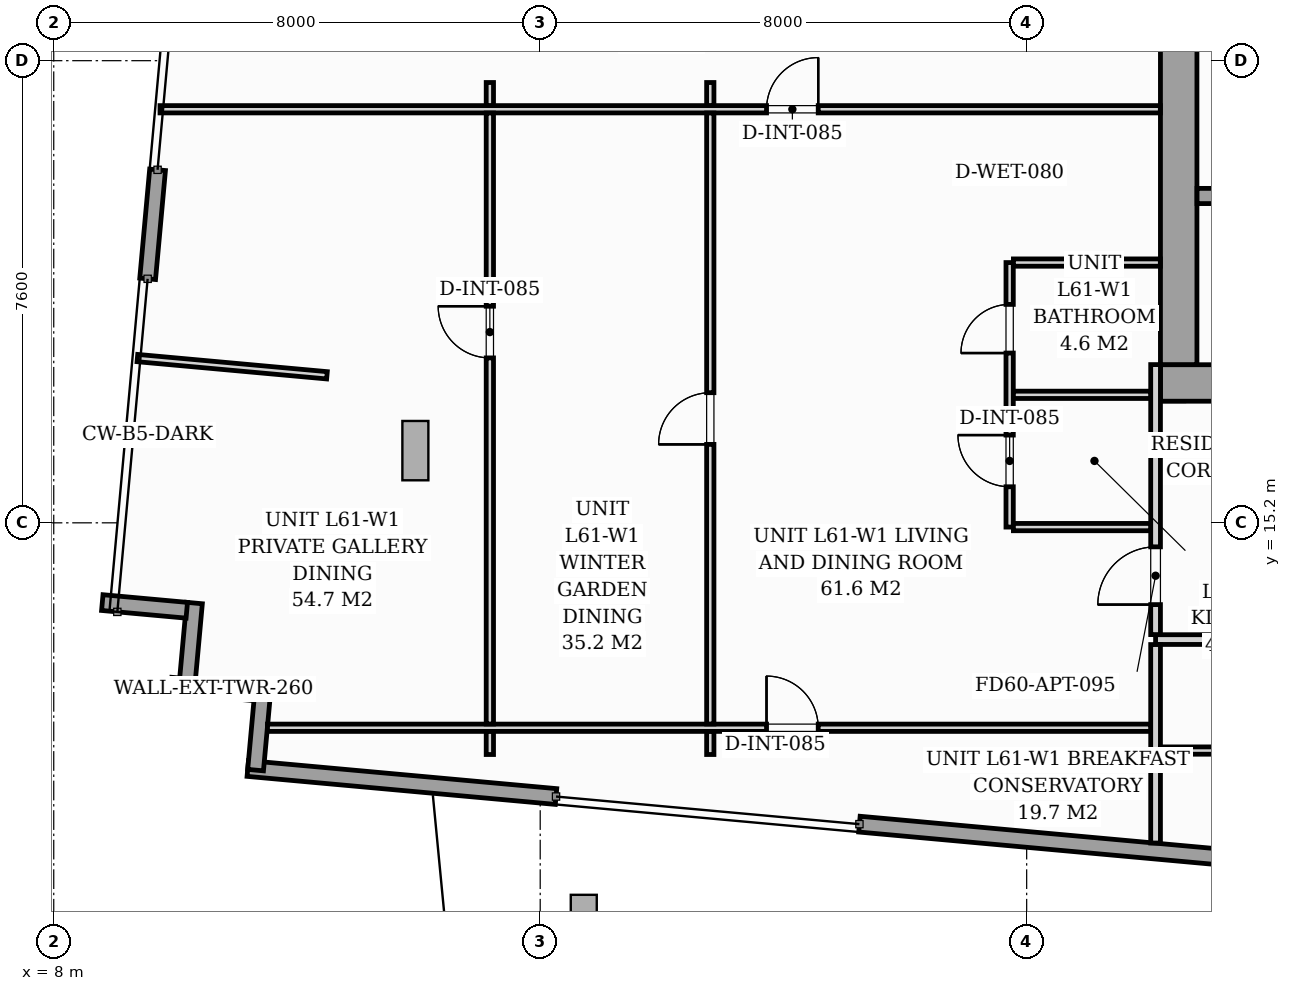
"""IFC4 building model, lengths in metres.
Left out: names, types, materials, properties, quantities, classifications, styles, units other than length and angle.
Written with IfcOpenShell. Run it as: python <this file> out.ifc"""

import sys

from ifc_helpers import new_model, si_unit, direction, frame, frame_2d, origin, origin_2d, place, context, subcontext, project, spatial, rectangle, i_section, extrude, source, transform, mapped, element, fill, save


model = new_model("IFC4")
c1 = context("Model", 3, precision=1e-05, world=origin(), true_north=direction((0.0, 1.0)))
c2 = subcontext(c1, "Body", "Model", "MODEL_VIEW")
j1 = project(units=[si_unit("LENGTHUNIT", "METRE"), si_unit("PLANEANGLEUNIT", "RADIAN")], contexts=[c1])
p1 = place(None, origin())
s1 = spatial("IfcSite", under=j1, at=p1, CompositionType="ELEMENT")
p2 = place(p1, origin())
s2 = spatial("IfcBuilding", under=s1, at=p2, CompositionType="ELEMENT")
p3 = place(p2, frame((0.0, 0.0, 211.4)))
s3 = spatial("IfcBuildingStorey", under=s2, at=p3, CompositionType="ELEMENT", Elevation=211.4)
m1 = source(origin(), c2, "Body", "SweptSolid", [
    extrude(i_section(OverallWidth=0.409, OverallDepth=0.425, WebThickness=0.033, FlangeThickness=0.052, FilletRadius=0.018, at=origin_2d()), origin(), (0.0, 0.0, 1.0), 5.196),
])
p4 = place(p3, frame((26.4, 17.4, 0.002), z_axis=(0.0, 0.0, 1.0), x_axis=(1.0, 0.0, 0.0)))
e1 = element("IfcColumn", 1, at=p4, inside=s3, PredefinedType="PILASTER", context=c2, shape_type="MappedRepresentation", body=[
    mapped(m1, transform((0.0, 0.0, 0.0), scale=1.0)),
])
m2 = source(origin(), c2, "Body", "SweptSolid", [
    extrude(i_section(OverallWidth=0.427, OverallDepth=0.976, WebThickness=0.031, FlangeThickness=0.056, FilletRadius=0.024, at=origin_2d()), origin(), (0.0, 0.0, 1.0), 8.14),
])
p5 = place(p3, frame((17.937, 7.606, 0.192), z_axis=(-0.653938069149, 0.5297612227, 0.540109293237), x_axis=(0.41967701375, -0.339984194884, 0.841594885535)))
e2 = element("IfcColumn", 2, at=p5, inside=s3, PredefinedType="COLUMN", context=c2, shape_type="MappedRepresentation", body=[
    mapped(m2, transform((0.0, 0.0, 0.0), scale=1.0)),
])
m3 = source(origin(), c2, "Body", "SweptSolid", [
    extrude(i_section(OverallWidth=0.427, OverallDepth=0.976, WebThickness=0.031, FlangeThickness=0.056, FilletRadius=0.024, at=origin_2d()), origin(), (0.0, 0.0, 1.0), 8.072),
])
p6 = place(p3, frame((28.796, 8.577, 0.191), z_axis=(-0.778187748082, 0.312466773891, 0.544782841092), x_axis=(0.50555077301, -0.202994482334, 0.838577161656)))
e3 = element("IfcColumn", 3, at=p6, inside=s3, PredefinedType="COLUMN", context=c2, shape_type="MappedRepresentation", body=[
    mapped(m3, transform((0.0, 0.0, 0.0), scale=1.0)),
])
m4 = source(origin(), c2, "Body", "SweptSolid", [
    extrude(i_section(OverallWidth=0.427, OverallDepth=0.976, WebThickness=0.031, FlangeThickness=0.056, FilletRadius=0.024, at=origin_2d()), origin(), (0.0, 0.0, 1.0), 7.437),
])
p7 = place(p3, frame((14.865, 15.359, 0.184), z_axis=(-0.53624427181, 0.600393978381, 0.593269880977), x_axis=(0.395200173603, -0.442477089191, 0.805003632492)))
e4 = element("IfcColumn", 4, at=p7, inside=s3, PredefinedType="COLUMN", context=c2, shape_type="MappedRepresentation", body=[
    mapped(m4, transform((0.0, 0.0, 0.0), scale=1.0)),
])
p8 = place(p3, frame((11.319, 12.404, 0.0), z_axis=(0.0, 0.0, 1.0), x_axis=(-0.995881721538, 0.090661991521, 0.0)))
e5 = element("IfcWall", 5, at=p8, inside=s3, PredefinedType="STANDARD", context=c2, shape_type="SweptSolid", body=[
    extrude(rectangle(XDim=1.395, YDim=0.26, at=frame_2d((0.698, 0.0))), origin(), (0.0, 0.0, 1.0), 4.78),
])
p9 = place(p3, frame((10.188, 12.492, 0.0), z_axis=(0.0, 0.0, 1.0), x_axis=(0.090646191665, 0.995883159782, 0.0)))
e6 = element("IfcWall", 6, at=p9, inside=s3, PredefinedType="STANDARD", context=c2, shape_type="SweptSolid", body=[
    extrude(rectangle(XDim=1.395, YDim=0.26, at=frame_2d((0.698, 0.0))), origin(), (0.0, 0.0, 1.0), 4.78),
])
p10 = place(p3, frame((10.188, 13.762, 0.0), z_axis=(0.0, 0.0, 1.0), x_axis=(-0.995881721538, 0.090661991521, 0.0)))
e7 = element("IfcWall", 7, at=p10, inside=s3, PredefinedType="STANDARD", context=c2, shape_type="SweptSolid", body=[
    extrude(rectangle(XDim=1.395, YDim=0.26, at=frame_2d((0.698, 0.0))), origin(), (0.0, 0.0, 1.0), 4.78),
])
p11 = place(p3, frame((9.544, 19.213, 0.0), z_axis=(0.0, 0.0, 1.0), x_axis=(0.090731396305, 0.995875400703, 0.0)))
e8 = element("IfcWall", 8, at=p11, inside=s3, PredefinedType="STANDARD", context=c2, shape_type="SweptSolid", body=[
    extrude(rectangle(XDim=1.8, YDim=0.26, at=frame_2d((0.9, 0.0))), origin(), (0.0, 0.0, 1.0), 4.78),
])
p12 = place(p3, frame((42.761, 8.287, 0.0), z_axis=(0.0, 0.0, 1.0), x_axis=(-0.995884956798, 0.090626446601, 0.0)))
e9 = element("IfcWall", 9, at=p12, inside=s3, PredefinedType="STANDARD", context=c2, shape_type="SweptSolid", body=[
    extrude(rectangle(XDim=21.6, YDim=0.26, at=frame_2d((10.8, 0.0))), origin(), (0.0, 0.0, 1.0), 4.78),
])
p13 = place(p12, frame((12.194, 0.0, 0.75)))
e10 = element("IfcOpeningElement", 10, at=p13, cuts=e9, PredefinedType="OPENING", context=c2, shape_type="SweptSolid", body=[
    extrude(rectangle(XDim=1.6, YDim=1.5, at=frame_2d((0.8, 0.75))), frame((0.0, 0.14, 0.0), z_axis=(0.0, -1.0, 0.0), x_axis=(1.0, 0.0, 0.0)), (0.0, 0.0, 1.0), 0.28),
])
p14 = place(p3, frame((16.26, 10.699, 0.0), z_axis=(0.0, 0.0, 1.0), x_axis=(-0.995882584574, 0.09065251095, 0.0)))
e11 = element("IfcWall", 11, at=p14, inside=s3, PredefinedType="STANDARD", context=c2, shape_type="SweptSolid", body=[
    extrude(rectangle(XDim=5.09, YDim=0.26, at=frame_2d((2.545, 0.0))), origin(), (0.0, 0.0, 1.0), 4.78),
])
p15 = place(p3, frame((11.319, 11.134, 0.0), z_axis=(0.0, 0.0, 1.0), x_axis=(0.090661991521, 0.995881721538, 0.0)))
e12 = element("IfcWall", 12, at=p15, inside=s3, PredefinedType="STANDARD", context=c2, shape_type="SweptSolid", body=[
    extrude(rectangle(XDim=1.395, YDim=0.26, at=frame_2d((0.698, 0.0))), origin(), (0.0, 0.0, 1.0), 4.78),
])
p16 = place(p3, frame((26.2, 17.5, 0.0), z_axis=(0.0, 0.0, 1.0), x_axis=(1.0, 0.0, 0.0)))
e13 = element("IfcWall", 13, at=p16, inside=s3, PredefinedType="SHEAR", context=c2, shape_type="SweptSolid", body=[
    extrude(rectangle(XDim=19.6, YDim=0.6, at=frame_2d((9.8, 0.0))), origin(), (0.0, 0.0, 1.0), 5.2),
])
p17 = place(p16, frame((0.95, 0.0, 0.0)))
e14 = element("IfcOpeningElement", 14, at=p17, cuts=e13, PredefinedType="OPENING", context=c2, shape_type="SweptSolid", body=[
    extrude(rectangle(XDim=0.95, YDim=2.06, at=frame_2d((0.475, 1.03))), frame((0.0, 0.31, 0.0), z_axis=(0.0, -1.0, 0.0), x_axis=(1.0, 0.0, 0.0)), (0.0, 0.0, 1.0), 0.62),
])
p18 = place(p16, frame((9.38, 0.0, 0.0)))
e15 = element("IfcOpeningElement", 15, at=p18, cuts=e13, PredefinedType="OPENING", context=c2, shape_type="SweptSolid", body=[
    extrude(rectangle(XDim=0.9, YDim=2.06, at=frame_2d((0.45, 1.03))), frame((0.0, 0.31, 0.0), z_axis=(0.0, -1.0, 0.0), x_axis=(1.0, 0.0, 0.0)), (0.0, 0.0, 1.0), 0.62),
])
p19 = place(p16, frame((17.55, 0.0, 0.0)))
e16 = element("IfcOpeningElement", 16, at=p19, cuts=e13, PredefinedType="OPENING", context=c2, shape_type="SweptSolid", body=[
    extrude(rectangle(XDim=0.95, YDim=2.06, at=frame_2d((0.475, 1.03))), frame((0.0, 0.31, 0.0), z_axis=(0.0, -1.0, 0.0), x_axis=(1.0, 0.0, 0.0)), (0.0, 0.0, 1.0), 0.62),
])
p20 = place(p3, frame((26.5, 17.802, 0.0), z_axis=(0.0, 0.0, 1.0), x_axis=(0.0, 1.0, 0.0)))
e17 = element("IfcWall", 17, at=p20, inside=s3, PredefinedType="SHEAR", context=c2, shape_type="SweptSolid", body=[
    extrude(rectangle(XDim=5.796, YDim=0.6, at=frame_2d((2.898, 0.0))), origin(), (0.0, 0.0, 1.0), 5.2),
])
p21 = place(p3, frame((26.802, 20.575, 0.0), z_axis=(0.0, 0.0, 1.0), x_axis=(1.0, 0.0, 0.0)))
e18 = element("IfcWall", 18, at=p21, inside=s3, PredefinedType="SOLIDWALL", context=c2, shape_type="SweptSolid", body=[
    extrude(rectangle(XDim=8.148, YDim=0.25, at=frame_2d((4.074, 0.0))), origin(), (0.0, 0.0, 1.0), 5.2),
])
p22 = place(p21, frame((0.298, 0.0, 0.0)))
e19 = element("IfcOpeningElement", 19, at=p22, cuts=e18, PredefinedType="OPENING", context=c2, shape_type="SweptSolid", body=[
    extrude(rectangle(XDim=0.95, YDim=2.06, at=frame_2d((0.475, 1.03))), frame((0.0, 0.135, 0.0), z_axis=(0.0, -1.0, 0.0), x_axis=(1.0, 0.0, 0.0)), (0.0, 0.0, 1.0), 0.27),
])
p23 = place(p3, frame((26.12, 13.28, 0.0), z_axis=(0.0, 0.0, 1.0), x_axis=(1.0, 0.0, 0.0)))
e20 = element("IfcWall", 20, at=p23, inside=s3, PredefinedType="PARTITIONING", context=c2, shape_type="SweptSolid", body=[
    extrude(rectangle(XDim=19.76, YDim=0.16, at=frame_2d((9.88, 0.0))), origin(), (0.0, 0.0, 1.0), 4.345),
])
p24 = place(p23, frame((5.345, 0.0, 0.0)))
e21 = element("IfcOpeningElement", 21, at=p24, cuts=e20, PredefinedType="OPENING", context=c2, shape_type="SweptSolid", body=[
    extrude(rectangle(XDim=0.95, YDim=2.06, at=frame_2d((0.475, 1.03))), frame((0.0, 0.09, 0.0), z_axis=(0.0, -1.0, 0.0), x_axis=(1.0, 0.0, 0.0)), (0.0, 0.0, 1.0), 0.18),
])
p25 = place(p23, frame((16.52, 0.0, 0.0)))
e22 = element("IfcOpeningElement", 22, at=p25, cuts=e20, PredefinedType="OPENING", context=c2, shape_type="SweptSolid", body=[
    extrude(rectangle(XDim=0.95, YDim=2.06, at=frame_2d((0.475, 1.03))), frame((0.0, 0.09, 0.0), z_axis=(0.0, -1.0, 0.0), x_axis=(1.0, 0.0, 0.0)), (0.0, 0.0, 1.0), 0.18),
])
p26 = place(p3, frame((26.12, 9.934, 0.0), z_axis=(0.0, 0.0, 1.0), x_axis=(0.0, 1.0, 0.0)))
e23 = element("IfcWall", 23, at=p26, inside=s3, PredefinedType="PARTITIONING", context=c2, shape_type="SweptSolid", body=[
    extrude(rectangle(XDim=3.264, YDim=0.16, at=frame_2d((1.632, 0.0))), origin(), (0.0, 0.0, 1.0), 4.78),
])
p27 = place(p3, frame((26.12, 13.362, 0.0), z_axis=(0.0, 0.0, 1.0), x_axis=(0.0, 1.0, 0.0)))
e24 = element("IfcWall", 24, at=p27, inside=s3, PredefinedType="PARTITIONING", context=c2, shape_type="SweptSolid", body=[
    extrude(rectangle(XDim=4.44, YDim=0.16, at=frame_2d((2.22, 0.0))), origin(), (0.0, 0.0, 1.0), 4.78),
])
p28 = place(p27, frame((0.493, 0.0, 0.0)))
e25 = element("IfcOpeningElement", 25, at=p28, cuts=e24, PredefinedType="OPENING", context=c2, shape_type="SweptSolid", body=[
    extrude(rectangle(XDim=0.95, YDim=2.06, at=frame_2d((0.475, 1.03))), frame((0.0, 0.09, 0.0), z_axis=(0.0, -1.0, 0.0), x_axis=(1.0, 0.0, 0.0)), (0.0, 0.0, 1.0), 0.18),
])
p29 = place(p3, frame((26.202, 11.455, 0.0), z_axis=(0.0, 0.0, 1.0), x_axis=(1.0, 0.0, 0.0)))
e26 = element("IfcWall", 26, at=p29, inside=s3, PredefinedType="PARTITIONING", context=c2, shape_type="SweptSolid", body=[
    extrude(rectangle(XDim=4.098, YDim=0.12, at=frame_2d((2.049, 0.0))), origin(), (0.0, 0.0, 1.0), 4.345),
])
p30 = place(p29, frame((1.14, 0.0, 0.0)))
e27 = element("IfcOpeningElement", 27, at=p30, cuts=e26, PredefinedType="OPENING", context=c2, shape_type="SweptSolid", body=[
    extrude(rectangle(XDim=0.55, YDim=2.0, at=frame_2d((0.275, 1.0))), frame((0.0, 0.07, 0.0), z_axis=(0.0, -1.0, 0.0), x_axis=(1.0, 0.0, 0.0)), (0.0, 0.0, 1.0), 0.14),
])
p31 = place(p29, frame((2.573, 0.0, 0.0)))
e28 = element("IfcOpeningElement", 28, at=p31, cuts=e26, PredefinedType="OPENING", context=c2, shape_type="SweptSolid", body=[
    extrude(rectangle(XDim=0.85, YDim=2.05, at=frame_2d((0.425, 1.025))), frame((0.0, 0.07, 0.0), z_axis=(0.0, -1.0, 0.0), x_axis=(1.0, 0.0, 0.0)), (0.0, 0.0, 1.0), 0.14),
])
p32 = place(p3, frame((23.72, 15.13, 0.0), z_axis=(0.0, 0.0, 1.0), x_axis=(0.0, 1.0, 0.0)))
e29 = element("IfcWall", 29, at=p32, inside=s3, PredefinedType="PARTITIONING", context=c2, shape_type="SweptSolid", body=[
    extrude(rectangle(XDim=4.35, YDim=0.12, at=frame_2d((2.175, 0.0))), origin(), (0.0, 0.0, 1.0), 4.78),
])
p33 = place(p32, frame((0.663, 0.0, 0.0)))
e30 = element("IfcOpeningElement", 30, at=p33, cuts=e29, PredefinedType="OPENING", context=c2, shape_type="SweptSolid", body=[
    extrude(rectangle(XDim=0.85, YDim=2.05, at=frame_2d((0.425, 1.025))), frame((0.0, 0.07, 0.0), z_axis=(0.0, -1.0, 0.0), x_axis=(1.0, 0.0, 0.0)), (0.0, 0.0, 1.0), 0.14),
])
p34 = place(p32, frame((2.862, 0.0, 0.0)))
e31 = element("IfcOpeningElement", 31, at=p34, cuts=e29, PredefinedType="OPENING", context=c2, shape_type="SweptSolid", body=[
    extrude(rectangle(XDim=0.8, YDim=2.02, at=frame_2d((0.4, 1.01))), frame((0.0, 0.07, 0.0), z_axis=(0.0, -1.0, 0.0), x_axis=(1.0, 0.0, 0.0)), (0.0, 0.0, 1.0), 0.14),
])
p35 = place(p3, frame((23.782, 17.305, 0.0), z_axis=(0.0, 0.0, 1.0), x_axis=(1.0, 0.0, 0.0)))
e32 = element("IfcWall", 32, at=p35, inside=s3, PredefinedType="PARTITIONING", context=c2, shape_type="SweptSolid", body=[
    extrude(rectangle(XDim=2.256, YDim=0.12, at=frame_2d((1.128, 0.0))), origin(), (0.0, 0.0, 1.0), 4.122),
])
p36 = place(p3, frame((23.782, 15.13, 0.0), z_axis=(0.0, 0.0, 1.0), x_axis=(1.0, 0.0, 0.0)))
e33 = element("IfcWall", 33, at=p36, inside=s3, PredefinedType="PARTITIONING", context=c2, shape_type="SweptSolid", body=[
    extrude(rectangle(XDim=2.256, YDim=0.12, at=frame_2d((1.128, 0.0))), origin(), (0.0, 0.0, 1.0), 4.78),
])
p37 = place(p3, frame((23.782, 19.48, 0.0), z_axis=(0.0, 0.0, 1.0), x_axis=(1.0, 0.0, 0.0)))
e34 = element("IfcWall", 34, at=p37, inside=s3, PredefinedType="PARTITIONING", context=c2, shape_type="SweptSolid", body=[
    extrude(rectangle(XDim=2.416, YDim=0.12, at=frame_2d((1.208, 0.0))), origin(), (0.0, 0.0, 1.0), 4.78),
])
p38 = place(p3, frame((9.748, 22.001, 0.0), z_axis=(0.0, 0.0, 1.0), x_axis=(1.0, 0.0, 0.0)))
e35 = element("IfcWall", 35, at=p38, inside=s3, PredefinedType="PARTITIONING", context=c2, shape_type="SweptSolid", body=[
    extrude(rectangle(XDim=16.45, YDim=0.12, at=frame_2d((8.225, 0.0))), origin(), (0.0, 0.0, 1.0), 4.78),
])
p39 = place(p38, frame((9.974, 0.0, 0.0)))
e36 = element("IfcOpeningElement", 36, at=p39, cuts=e35, PredefinedType="OPENING", context=c2, shape_type="SweptSolid", body=[
    extrude(rectangle(XDim=0.85, YDim=2.05, at=frame_2d((0.425, 1.025))), frame((0.0, 0.07, 0.0), z_axis=(0.0, -1.0, 0.0), x_axis=(1.0, 0.0, 0.0)), (0.0, 0.0, 1.0), 0.14),
])
p40 = place(p3, frame((11.515, 11.83, 0.0), z_axis=(0.0, 0.0, 1.0), x_axis=(1.0, 0.0, 0.0)))
e37 = element("IfcWall", 37, at=p40, inside=s3, PredefinedType="PARTITIONING", context=c2, shape_type="SweptSolid", body=[
    extrude(rectangle(XDim=14.523, YDim=0.12, at=frame_2d((7.261, 0.0))), origin(), (0.0, 0.0, 1.0), 3.814),
])
p41 = place(p40, frame((8.207, 0.0, 0.0)))
e38 = element("IfcOpeningElement", 38, at=p41, cuts=e37, PredefinedType="OPENING", context=c2, shape_type="SweptSolid", body=[
    extrude(rectangle(XDim=0.85, YDim=2.05, at=frame_2d((0.425, 1.025))), frame((0.0, 0.07, 0.0), z_axis=(0.0, -1.0, 0.0), x_axis=(1.0, 0.0, 0.0)), (0.0, 0.0, 1.0), 0.14),
])
p42 = place(p3, frame((15.172, 11.39, 0.0), z_axis=(0.0, 0.0, 1.0), x_axis=(0.0, 1.0, 0.0)))
e39 = element("IfcWall", 39, at=p42, inside=s3, PredefinedType="PARTITIONING", context=c2, shape_type="SweptSolid", body=[
    extrude(rectangle(XDim=0.378, YDim=0.12, at=frame_2d((0.189, 0.0))), origin(), (0.0, 0.0, 1.0), 4.78),
])
p43 = place(p3, frame((15.172, 11.892, 0.0), z_axis=(0.0, 0.0, 1.0), x_axis=(0.0, 1.0, 0.0)))
e40 = element("IfcWall", 40, at=p43, inside=s3, PredefinedType="PARTITIONING", context=c2, shape_type="SweptSolid", body=[
    extrude(rectangle(XDim=10.047, YDim=0.12, at=frame_2d((5.023, 0.0))), origin(), (0.0, 0.0, 1.0), 4.78),
])
p44 = place(p43, frame((6.02, 0.0, 0.0)))
e41 = element("IfcOpeningElement", 41, at=p44, cuts=e40, PredefinedType="OPENING", context=c2, shape_type="SweptSolid", body=[
    extrude(rectangle(XDim=0.85, YDim=2.05, at=frame_2d((0.425, 1.025))), frame((0.0, 0.07, 0.0), z_axis=(0.0, -1.0, 0.0), x_axis=(1.0, 0.0, 0.0)), (0.0, 0.0, 1.0), 0.14),
])
p45 = place(p3, frame((15.172, 22.063, 0.0), z_axis=(0.0, 0.0, 1.0), x_axis=(0.0, 1.0, 0.0)))
e42 = element("IfcWall", 42, at=p45, inside=s3, PredefinedType="PARTITIONING", context=c2, shape_type="SweptSolid", body=[
    extrude(rectangle(XDim=0.378, YDim=0.12, at=frame_2d((0.189, 0.0))), origin(), (0.0, 0.0, 1.0), 4.78),
])
p46 = place(p3, frame((18.797, 11.39, 0.0), z_axis=(0.0, 0.0, 1.0), x_axis=(0.0, 1.0, 0.0)))
e43 = element("IfcWall", 43, at=p46, inside=s3, PredefinedType="PARTITIONING", context=c2, shape_type="SweptSolid", body=[
    extrude(rectangle(XDim=0.378, YDim=0.12, at=frame_2d((0.189, 0.0))), origin(), (0.0, 0.0, 1.0), 4.78),
])
p47 = place(p3, frame((18.797, 11.892, 0.0), z_axis=(0.0, 0.0, 1.0), x_axis=(0.0, 1.0, 0.0)))
e44 = element("IfcWall", 44, at=p47, inside=s3, PredefinedType="PARTITIONING", context=c2, shape_type="SweptSolid", body=[
    extrude(rectangle(XDim=10.047, YDim=0.12, at=frame_2d((5.023, 0.0))), origin(), (0.0, 0.0, 1.0), 4.78),
])
p48 = place(p47, frame((4.598, 0.0, 0.0)))
e45 = element("IfcOpeningElement", 45, at=p48, cuts=e44, PredefinedType="OPENING", context=c2, shape_type="SweptSolid", body=[
    extrude(rectangle(XDim=0.85, YDim=2.05, at=frame_2d((0.425, 1.025))), frame((0.0, 0.07, 0.0), z_axis=(0.0, -1.0, 0.0), x_axis=(1.0, 0.0, 0.0)), (0.0, 0.0, 1.0), 0.14),
])
p49 = place(p3, frame((18.797, 22.063, 0.0), z_axis=(0.0, 0.0, 1.0), x_axis=(0.0, 1.0, 0.0)))
e46 = element("IfcWall", 46, at=p49, inside=s3, PredefinedType="PARTITIONING", context=c2, shape_type="SweptSolid", body=[
    extrude(rectangle(XDim=0.378, YDim=0.12, at=frame_2d((0.189, 0.0))), origin(), (0.0, 0.0, 1.0), 4.78),
])
p50 = place(p3, frame((12.493, 17.626, 0.0), z_axis=(0.0, 0.0, 1.0), x_axis=(-0.995885532106, 0.090620124378, 0.0)))
e47 = element("IfcWall", 47, at=p50, inside=s3, PredefinedType="PARTITIONING", context=c2, shape_type="SweptSolid", body=[
    extrude(rectangle(XDim=3.131, YDim=0.12, at=frame_2d((1.565, 0.0))), origin(), (0.0, 0.0, 1.0), 4.78),
])
m5 = source(origin(), c2, "Body", "SweptSolid", [
    extrude(rectangle(XDim=0.95, YDim=2.06, at=frame_2d((0.475, 1.03))), frame((0.0, 0.025, 0.0), z_axis=(0.0, -1.0, 0.0), x_axis=(1.0, 0.0, 0.0)), (0.0, 0.0, 1.0), 0.05),
])
p51 = place(p28, origin())
e48 = element("IfcDoor", 48, at=p51, inside=s3, OperationType="SINGLE_SWING_LEFT", PredefinedType="DOOR", context=c2, shape_type="MappedRepresentation", body=[
    mapped(m5, transform((0.0, 0.0, 0.0), scale=1.0)),
])
fill(e25, e48)
m6 = source(origin(), c2, "Body", "SweptSolid", [
    extrude(rectangle(XDim=0.85, YDim=2.05, at=frame_2d((0.425, 1.025))), frame((0.0, 0.025, 0.0), z_axis=(0.0, -1.0, 0.0), x_axis=(1.0, 0.0, 0.0)), (0.0, 0.0, 1.0), 0.05),
])
p52 = place(p33, origin())
e49 = element("IfcDoor", 49, at=p52, inside=s3, OperationType="SINGLE_SWING_RIGHT", PredefinedType="DOOR", context=c2, shape_type="MappedRepresentation", body=[
    mapped(m6, transform((0.0, 0.0, 0.0), scale=1.0)),
])
fill(e30, e49)
m7 = source(origin(), c2, "Body", "SweptSolid", [
    extrude(rectangle(XDim=0.8, YDim=2.02, at=frame_2d((0.4, 1.01))), frame((0.0, 0.025, 0.0), z_axis=(0.0, -1.0, 0.0), x_axis=(1.0, 0.0, 0.0)), (0.0, 0.0, 1.0), 0.05),
])
p53 = place(p34, origin())
e50 = element("IfcDoor", 50, at=p53, inside=s3, OperationType="SINGLE_SWING_LEFT", PredefinedType="DOOR", context=c2, shape_type="MappedRepresentation", body=[
    mapped(m7, transform((0.0, 0.0, 0.0), scale=1.0)),
])
fill(e31, e50)
p54 = place(p39, origin())
e51 = element("IfcDoor", 51, at=p54, inside=s3, OperationType="SINGLE_SWING_RIGHT", PredefinedType="DOOR", context=c2, shape_type="MappedRepresentation", body=[
    mapped(m6, transform((0.0, 0.0, 0.0), scale=1.0)),
])
fill(e36, e51)
p55 = place(p41, origin())
e52 = element("IfcDoor", 52, at=p55, inside=s3, OperationType="SINGLE_SWING_LEFT", PredefinedType="DOOR", context=c2, shape_type="MappedRepresentation", body=[
    mapped(m6, transform((0.0, 0.0, 0.0), scale=1.0)),
])
fill(e38, e52)
p56 = place(p44, origin())
e53 = element("IfcDoor", 53, at=p56, inside=s3, OperationType="SINGLE_SWING_RIGHT", PredefinedType="DOOR", context=c2, shape_type="MappedRepresentation", body=[
    mapped(m6, transform((0.0, 0.0, 0.0), scale=1.0)),
])
fill(e41, e53)
p57 = place(p48, origin())
e54 = element("IfcDoor", 54, at=p57, inside=s3, OperationType="SINGLE_SWING_LEFT", PredefinedType="DOOR", context=c2, shape_type="MappedRepresentation", body=[
    mapped(m6, transform((0.0, 0.0, 0.0), scale=1.0)),
])
fill(e45, e54)
save(model, sys.argv[1])
